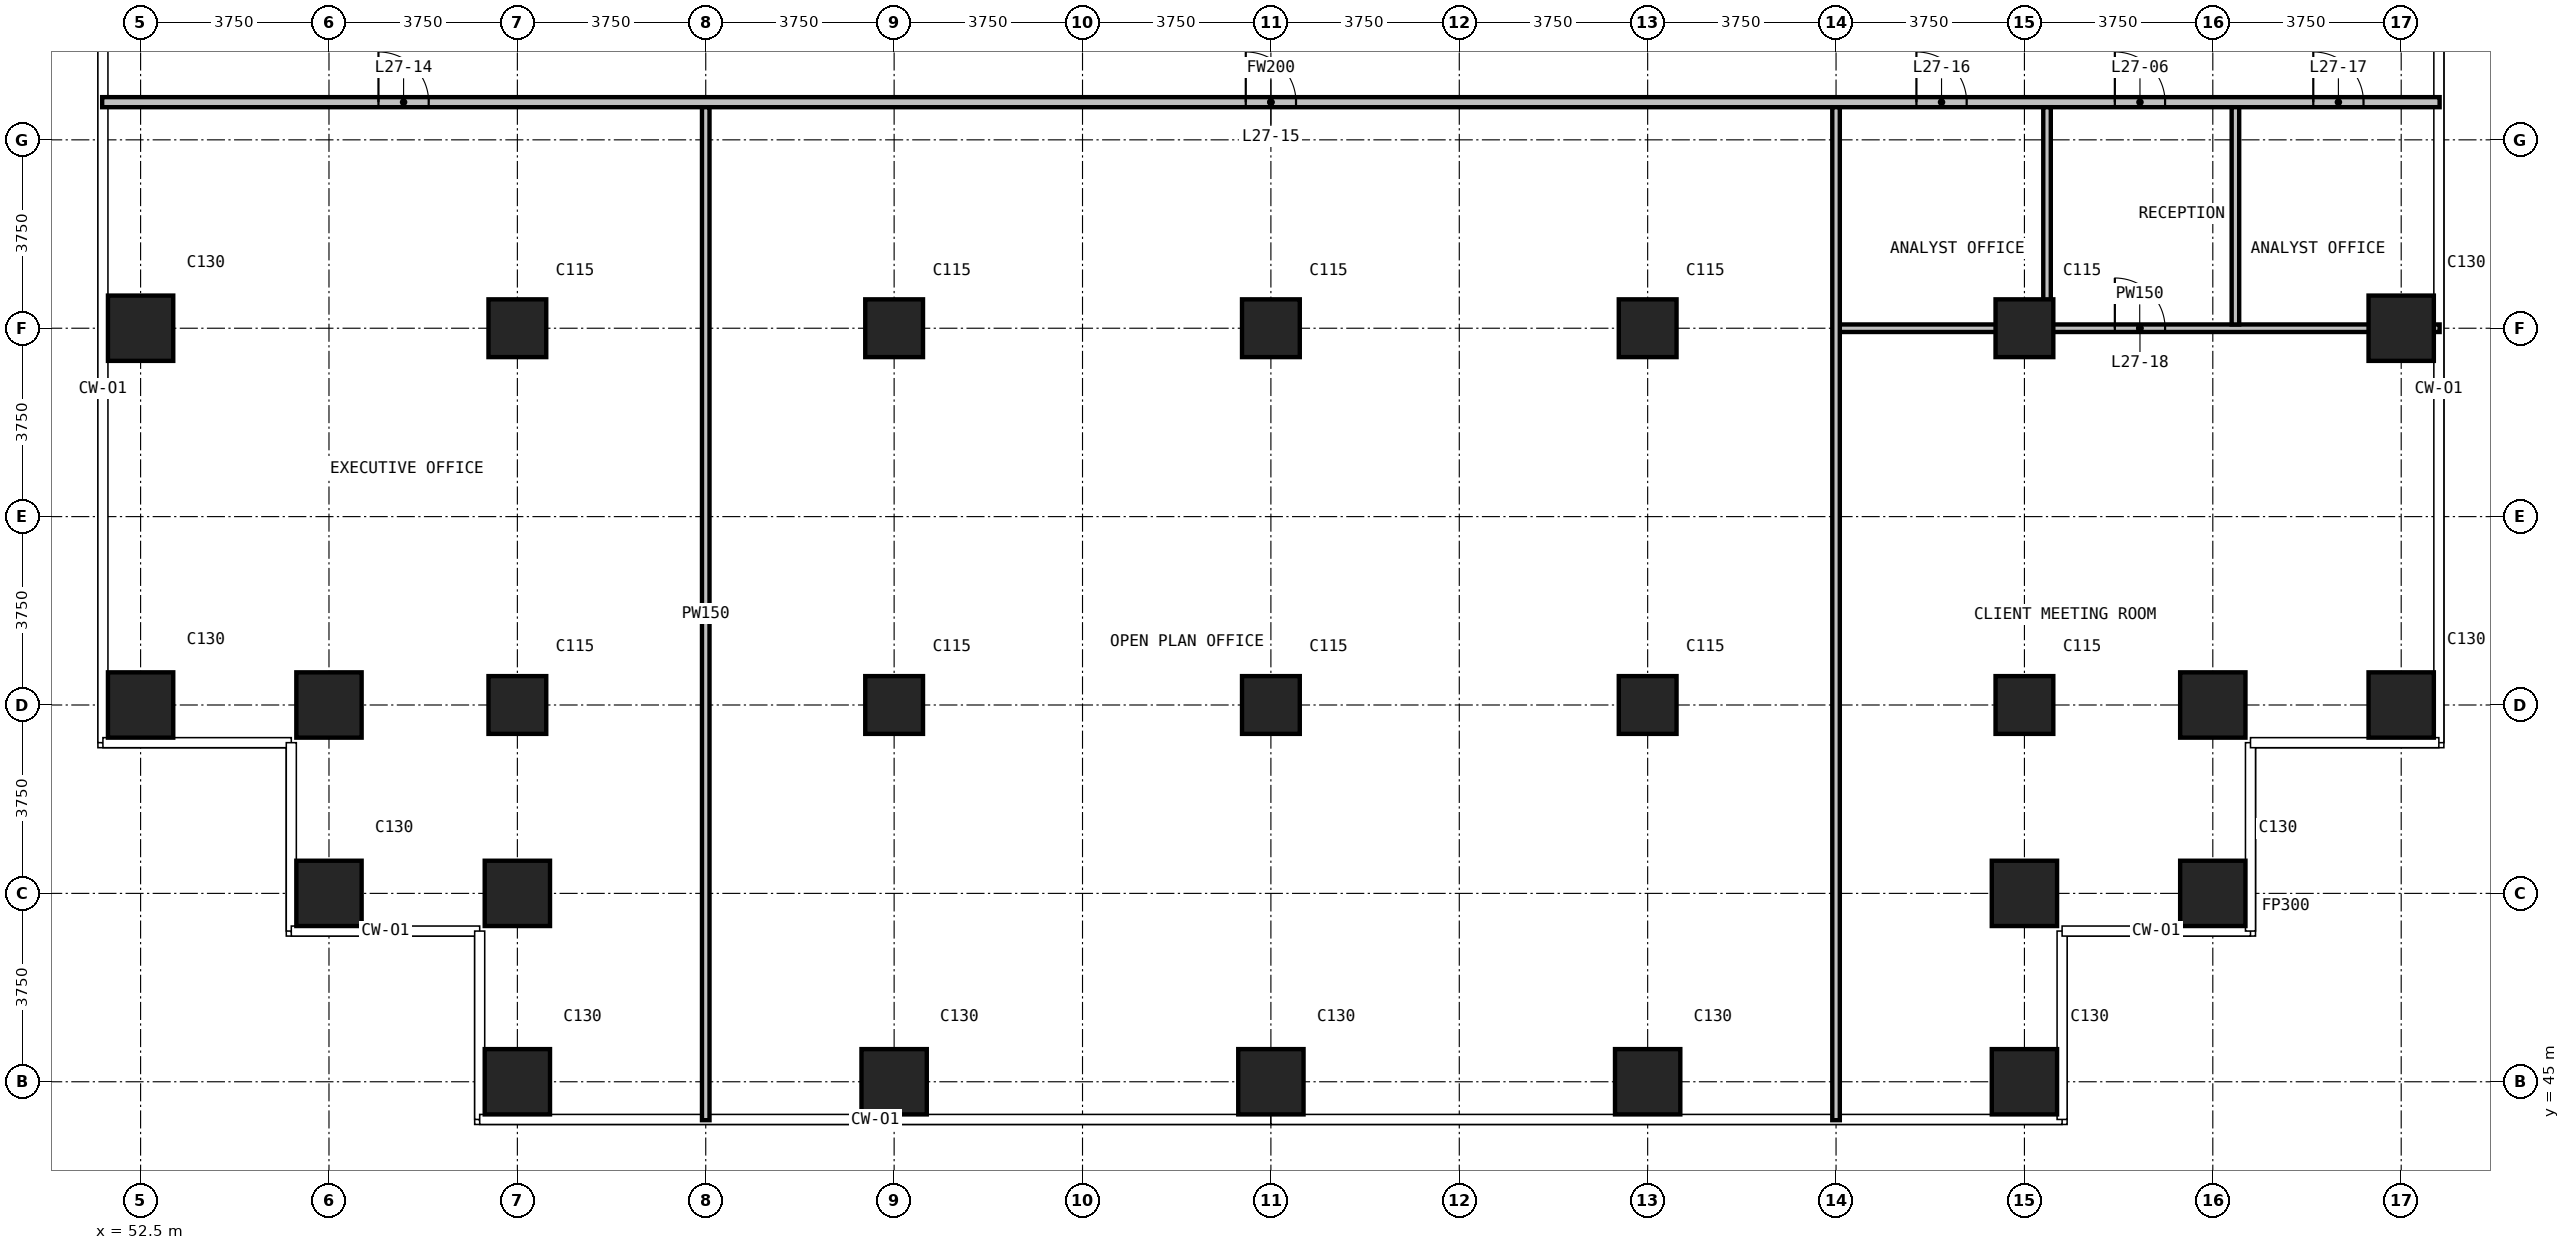
"""IFC4 building model, lengths in metres.
Left out: names, types, materials, properties, quantities, classifications, styles, units other than length and angle.
Written with IfcOpenShell. Run it as: python <this file> out.ifc"""

import sys

from ifc_helpers import new_model, si_unit, direction, frame, frame_2d, origin, origin_2d, place, context, subcontext, project, spatial, rectangle, extrude, element, fill, save


model = new_model("IFC4")
c1 = context("Model", 3, precision=1e-05, world=origin(), true_north=direction((0.0, 1.0)))
c2 = subcontext(c1, "Body", "Model", "MODEL_VIEW")
j1 = project(units=[si_unit("LENGTHUNIT", "METRE"), si_unit("PLANEANGLEUNIT", "RADIAN")], contexts=[c1])
p1 = place(None, origin())
s1 = spatial("IfcSite", under=j1, at=p1, CompositionType="ELEMENT")
p2 = place(p1, origin())
s2 = spatial("IfcBuilding", under=s1, at=p2, CompositionType="ELEMENT")
p3 = place(p2, frame((0.0, 0.0, 110.8)))
s3 = spatial("IfcBuildingStorey", under=s2, at=p3, CompositionType="ELEMENT", Elevation=110.8)
for number, where, z_axis, x_axis in (
    (1, (52.5, 52.5, 0.0), (0.0, 0.0, 1.0), (1.0, 0.0, 0.0)),
    (2, (52.5, 60.0, 0.0), (0.0, 0.0, 1.0), (1.0, 0.0, 0.0)),
    (3, (56.25, 48.75, 0.0), (0.0, 0.0, 1.0), (1.0, 0.0, 0.0)),
    (4, (56.25, 52.5, 0.0), (0.0, 0.0, 1.0), (1.0, 0.0, 0.0)),
    (5, (60.0, 45.0, 0.0), (0.0, 0.0, 1.0), (1.0, 0.0, 0.0)),
    (6, (60.0, 48.75, 0.0), (0.0, 0.0, 1.0), (1.0, 0.0, 0.0)),
):
    element("IfcColumn", number, at=place(p3, frame(where, z_axis=z_axis, x_axis=x_axis)), inside=s3, PredefinedType="COLUMN", context=c2, shape_type="SweptSolid", body=[
        extrude(rectangle(XDim=1.3, YDim=1.3, at=origin_2d()), origin(), (0.0, 0.0, 1.0), 3.6),
    ])
for number, where, z_axis, x_axis in (
    (7, (60.0, 52.5, 0.0), (0.0, 0.0, 1.0), (1.0, 0.0, 0.0)),
    (8, (60.0, 60.0, 0.0), (0.0, 0.0, 1.0), (1.0, 0.0, 0.0)),
):
    element("IfcColumn", number, at=place(p3, frame(where, z_axis=z_axis, x_axis=x_axis)), inside=s3, PredefinedType="COLUMN", context=c2, shape_type="SweptSolid", body=[
        extrude(rectangle(XDim=1.15, YDim=1.15, at=origin_2d()), origin(), (0.0, 0.0, 1.0), 3.6),
    ])
p4 = place(p3, frame((67.5, 45.0, 0.0), z_axis=(0.0, 0.0, 1.0), x_axis=(1.0, 0.0, 0.0)))
e9 = element("IfcColumn", 9, at=p4, inside=s3, PredefinedType="COLUMN", context=c2, shape_type="SweptSolid", body=[
    extrude(rectangle(XDim=1.3, YDim=1.3, at=origin_2d()), origin(), (0.0, 0.0, 1.0), 3.6),
])
for number, where, z_axis, x_axis in (
    (10, (67.5, 52.5, 0.0), (0.0, 0.0, 1.0), (1.0, 0.0, 0.0)),
    (11, (67.5, 60.0, 0.0), (0.0, 0.0, 1.0), (1.0, 0.0, 0.0)),
):
    element("IfcColumn", number, at=place(p3, frame(where, z_axis=z_axis, x_axis=x_axis)), inside=s3, PredefinedType="COLUMN", context=c2, shape_type="SweptSolid", body=[
        extrude(rectangle(XDim=1.15, YDim=1.15, at=origin_2d()), origin(), (0.0, 0.0, 1.0), 3.6),
    ])
p5 = place(p3, frame((75.0, 45.0, 0.0), z_axis=(0.0, 0.0, 1.0), x_axis=(1.0, 0.0, 0.0)))
e12 = element("IfcColumn", 12, at=p5, inside=s3, PredefinedType="COLUMN", context=c2, shape_type="SweptSolid", body=[
    extrude(rectangle(XDim=1.3, YDim=1.3, at=origin_2d()), origin(), (0.0, 0.0, 1.0), 3.6),
])
for number, where, z_axis, x_axis in (
    (13, (75.0, 52.5, 0.0), (0.0, 0.0, 1.0), (1.0, 0.0, 0.0)),
    (14, (75.0, 60.0, 0.0), (0.0, 0.0, 1.0), (1.0, 0.0, 0.0)),
):
    element("IfcColumn", number, at=place(p3, frame(where, z_axis=z_axis, x_axis=x_axis)), inside=s3, PredefinedType="COLUMN", context=c2, shape_type="SweptSolid", body=[
        extrude(rectangle(XDim=1.15, YDim=1.15, at=origin_2d()), origin(), (0.0, 0.0, 1.0), 3.6),
    ])
p6 = place(p3, frame((82.5, 45.0, 0.0), z_axis=(0.0, 0.0, 1.0), x_axis=(1.0, 0.0, 0.0)))
e15 = element("IfcColumn", 15, at=p6, inside=s3, PredefinedType="COLUMN", context=c2, shape_type="SweptSolid", body=[
    extrude(rectangle(XDim=1.3, YDim=1.3, at=origin_2d()), origin(), (0.0, 0.0, 1.0), 3.6),
])
for number, where, z_axis, x_axis in (
    (16, (82.5, 52.5, 0.0), (0.0, 0.0, 1.0), (1.0, 0.0, 0.0)),
    (17, (82.5, 60.0, 0.0), (0.0, 0.0, 1.0), (1.0, 0.0, 0.0)),
):
    element("IfcColumn", number, at=place(p3, frame(where, z_axis=z_axis, x_axis=x_axis)), inside=s3, PredefinedType="COLUMN", context=c2, shape_type="SweptSolid", body=[
        extrude(rectangle(XDim=1.15, YDim=1.15, at=origin_2d()), origin(), (0.0, 0.0, 1.0), 3.6),
    ])
for number, where, z_axis, x_axis in (
    (18, (90.0, 45.0, 0.0), (0.0, 0.0, 1.0), (1.0, 0.0, 0.0)),
    (19, (90.0, 48.75, 0.0), (0.0, 0.0, 1.0), (1.0, 0.0, 0.0)),
):
    element("IfcColumn", number, at=place(p3, frame(where, z_axis=z_axis, x_axis=x_axis)), inside=s3, PredefinedType="COLUMN", context=c2, shape_type="SweptSolid", body=[
        extrude(rectangle(XDim=1.3, YDim=1.3, at=origin_2d()), origin(), (0.0, 0.0, 1.0), 3.6),
    ])
for number, where, z_axis, x_axis in (
    (20, (90.0, 52.5, 0.0), (0.0, 0.0, 1.0), (1.0, 0.0, 0.0)),
    (21, (90.0, 60.0, 0.0), (0.0, 0.0, 1.0), (1.0, 0.0, 0.0)),
):
    element("IfcColumn", number, at=place(p3, frame(where, z_axis=z_axis, x_axis=x_axis)), inside=s3, PredefinedType="COLUMN", context=c2, shape_type="SweptSolid", body=[
        extrude(rectangle(XDim=1.15, YDim=1.15, at=origin_2d()), origin(), (0.0, 0.0, 1.0), 3.6),
    ])
for number, where, z_axis, x_axis in (
    (22, (93.75, 48.75, 0.0), (0.0, 0.0, 1.0), (1.0, 0.0, 0.0)),
    (23, (93.75, 52.5, 0.0), (0.0, 0.0, 1.0), (1.0, 0.0, 0.0)),
    (24, (97.5, 52.5, 0.0), (0.0, 0.0, 1.0), (1.0, 0.0, 0.0)),
    (25, (97.5, 60.0, 0.0), (0.0, 0.0, 1.0), (1.0, 0.0, 0.0)),
):
    element("IfcColumn", number, at=place(p3, frame(where, z_axis=z_axis, x_axis=x_axis)), inside=s3, PredefinedType="COLUMN", context=c2, shape_type="SweptSolid", body=[
        extrude(rectangle(XDim=1.3, YDim=1.3, at=origin_2d()), origin(), (0.0, 0.0, 1.0), 3.6),
    ])
p7 = place(p3, frame((51.735, 64.5, 0.0), z_axis=(0.0, 0.0, 1.0), x_axis=(1.0, 0.0, 0.0)))
e26 = element("IfcWall", 26, at=p7, inside=s3, PredefinedType="PARTITIONING", context=c2, shape_type="SweptSolid", body=[
    extrude(rectangle(XDim=46.53, YDim=0.2, at=frame_2d((23.265, 0.0))), origin(), (0.0, 0.0, 1.0), 3.3),
])
p8 = place(p7, frame((40.065, 0.0, 0.0)))
e27 = element("IfcOpeningElement", 27, at=p8, cuts=e26, PredefinedType="OPENING", context=c2, shape_type="SweptSolid", body=[
    extrude(rectangle(XDim=1.0, YDim=2.2, at=frame_2d((0.5, 1.1))), frame((0.0, 0.11, 0.0), z_axis=(0.0, -1.0, 0.0), x_axis=(1.0, 0.0, 0.0)), (0.0, 0.0, 1.0), 0.22),
])
p9 = place(p7, frame((5.5, 0.0, 0.0)))
e28 = element("IfcOpeningElement", 28, at=p9, cuts=e26, PredefinedType="OPENING", context=c2, shape_type="SweptSolid", body=[
    extrude(rectangle(XDim=1.0, YDim=2.2, at=frame_2d((0.5, 1.1))), frame((0.0, 0.11, 0.0), z_axis=(0.0, -1.0, 0.0), x_axis=(1.0, 0.0, 0.0)), (0.0, 0.0, 1.0), 0.22),
])
p10 = place(p7, frame((22.765, 0.0, 0.0)))
e29 = element("IfcOpeningElement", 29, at=p10, cuts=e26, PredefinedType="OPENING", context=c2, shape_type="SweptSolid", body=[
    extrude(rectangle(XDim=1.0, YDim=2.2, at=frame_2d((0.5, 1.1))), frame((0.0, 0.11, 0.0), z_axis=(0.0, -1.0, 0.0), x_axis=(1.0, 0.0, 0.0)), (0.0, 0.0, 1.0), 0.22),
])
p11 = place(p7, frame((36.115, 0.0, 0.0)))
e30 = element("IfcOpeningElement", 30, at=p11, cuts=e26, PredefinedType="OPENING", context=c2, shape_type="SweptSolid", body=[
    extrude(rectangle(XDim=1.0, YDim=2.2, at=frame_2d((0.5, 1.1))), frame((0.0, 0.11, 0.0), z_axis=(0.0, -1.0, 0.0), x_axis=(1.0, 0.0, 0.0)), (0.0, 0.0, 1.0), 0.22),
])
p12 = place(p7, frame((44.015, 0.0, 0.0)))
e31 = element("IfcOpeningElement", 31, at=p12, cuts=e26, PredefinedType="OPENING", context=c2, shape_type="SweptSolid", body=[
    extrude(rectangle(XDim=1.0, YDim=2.2, at=frame_2d((0.5, 1.1))), frame((0.0, 0.11, 0.0), z_axis=(0.0, -1.0, 0.0), x_axis=(1.0, 0.0, 0.0)), (0.0, 0.0, 1.0), 0.22),
])
p13 = place(p3, frame((86.325, 60.0, 0.0), z_axis=(0.0, 0.0, 1.0), x_axis=(1.0, 0.0, 0.0)))
e32 = element("IfcWall", 32, at=p13, inside=s3, PredefinedType="PARTITIONING", context=c2, shape_type="SweptSolid", body=[
    extrude(rectangle(XDim=11.94, YDim=0.15, at=frame_2d((5.97, 0.0))), origin(), (0.0, 0.0, 1.0), 3.3),
])
p14 = place(p13, frame((5.475, 0.0, 0.0)))
e33 = element("IfcOpeningElement", 33, at=p14, cuts=e32, PredefinedType="OPENING", context=c2, shape_type="SweptSolid", body=[
    extrude(rectangle(XDim=1.0, YDim=2.2, at=frame_2d((0.5, 1.1))), frame((0.0, 0.085, 0.0), z_axis=(0.0, -1.0, 0.0), x_axis=(1.0, 0.0, 0.0)), (0.0, 0.0, 1.0), 0.17),
])
for number, where, z_axis, x_axis in (
    (34, (63.75, 44.235, 0.0), (0.0, 0.0, 1.0), (0.0, 1.0, 0.0)),
    (35, (86.25, 44.235, 0.0), (0.0, 0.0, 1.0), (0.0, 1.0, 0.0)),
):
    element("IfcWall", number, at=place(p3, frame(where, z_axis=z_axis, x_axis=x_axis)), inside=s3, PredefinedType="PARTITIONING", context=c2, shape_type="SweptSolid", body=[
        extrude(rectangle(XDim=20.165, YDim=0.15, at=frame_2d((10.083, 0.0))), origin(), (0.0, 0.0, 1.0), 3.3),
    ])
for number, where, z_axis, x_axis in (
    (36, (90.45, 60.075, 0.0), (0.0, 0.0, 1.0), (0.0, 1.0, 0.0)),
    (37, (94.2, 60.075, 0.0), (0.0, 0.0, 1.0), (0.0, 1.0, 0.0)),
):
    element("IfcWall", number, at=place(p3, frame(where, z_axis=z_axis, x_axis=x_axis)), inside=s3, PredefinedType="PARTITIONING", context=c2, shape_type="SweptSolid", body=[
        extrude(rectangle(XDim=4.325, YDim=0.15, at=frame_2d((2.163, 0.0))), origin(), (0.0, 0.0, 1.0), 3.3),
    ])
p15 = place(p8, origin())
e38 = element("IfcDoor", 38, at=p15, inside=s3, OperationType="SINGLE_SWING_RIGHT", PredefinedType="DOOR", context=c2, shape_type="SweptSolid", body=[
    extrude(rectangle(XDim=1.0, YDim=2.2, at=frame_2d((0.5, 1.1))), frame((0.0, 0.025, 0.0), z_axis=(0.0, -1.0, 0.0), x_axis=(1.0, 0.0, 0.0)), (0.0, 0.0, 1.0), 0.05),
])
fill(e27, e38)
p16 = place(p9, origin())
e39 = element("IfcDoor", 39, at=p16, inside=s3, OperationType="SINGLE_SWING_LEFT", PredefinedType="DOOR", context=c2, shape_type="SweptSolid", body=[
    extrude(rectangle(XDim=1.0, YDim=2.2, at=frame_2d((0.5, 1.1))), frame((0.0, 0.025, 0.0), z_axis=(0.0, -1.0, 0.0), x_axis=(1.0, 0.0, 0.0)), (0.0, 0.0, 1.0), 0.05),
])
fill(e28, e39)
p17 = place(p10, origin())
e40 = element("IfcDoor", 40, at=p17, inside=s3, OperationType="SINGLE_SWING_LEFT", PredefinedType="DOOR", context=c2, shape_type="SweptSolid", body=[
    extrude(rectangle(XDim=1.0, YDim=2.2, at=frame_2d((0.5, 1.1))), frame((0.0, 0.025, 0.0), z_axis=(0.0, -1.0, 0.0), x_axis=(1.0, 0.0, 0.0)), (0.0, 0.0, 1.0), 0.05),
])
fill(e29, e40)
p18 = place(p11, origin())
e41 = element("IfcDoor", 41, at=p18, inside=s3, OperationType="SINGLE_SWING_RIGHT", PredefinedType="DOOR", context=c2, shape_type="SweptSolid", body=[
    extrude(rectangle(XDim=1.0, YDim=2.2, at=frame_2d((0.5, 1.1))), frame((0.0, 0.025, 0.0), z_axis=(0.0, -1.0, 0.0), x_axis=(1.0, 0.0, 0.0)), (0.0, 0.0, 1.0), 0.05),
])
fill(e30, e41)
p19 = place(p12, origin())
e42 = element("IfcDoor", 42, at=p19, inside=s3, OperationType="SINGLE_SWING_LEFT", PredefinedType="DOOR", context=c2, shape_type="SweptSolid", body=[
    extrude(rectangle(XDim=1.0, YDim=2.2, at=frame_2d((0.5, 1.1))), frame((0.0, 0.025, 0.0), z_axis=(0.0, -1.0, 0.0), x_axis=(1.0, 0.0, 0.0)), (0.0, 0.0, 1.0), 0.05),
])
fill(e31, e42)
p20 = place(p14, origin())
e43 = element("IfcDoor", 43, at=p20, inside=s3, OperationType="SINGLE_SWING_LEFT", PredefinedType="DOOR", context=c2, shape_type="SweptSolid", body=[
    extrude(rectangle(XDim=1.0, YDim=2.2, at=frame_2d((0.5, 1.1))), frame((0.0, 0.025, 0.0), z_axis=(0.0, -1.0, 0.0), x_axis=(1.0, 0.0, 0.0)), (0.0, 0.0, 1.0), 0.05),
])
fill(e33, e43)
save(model, sys.argv[1])
